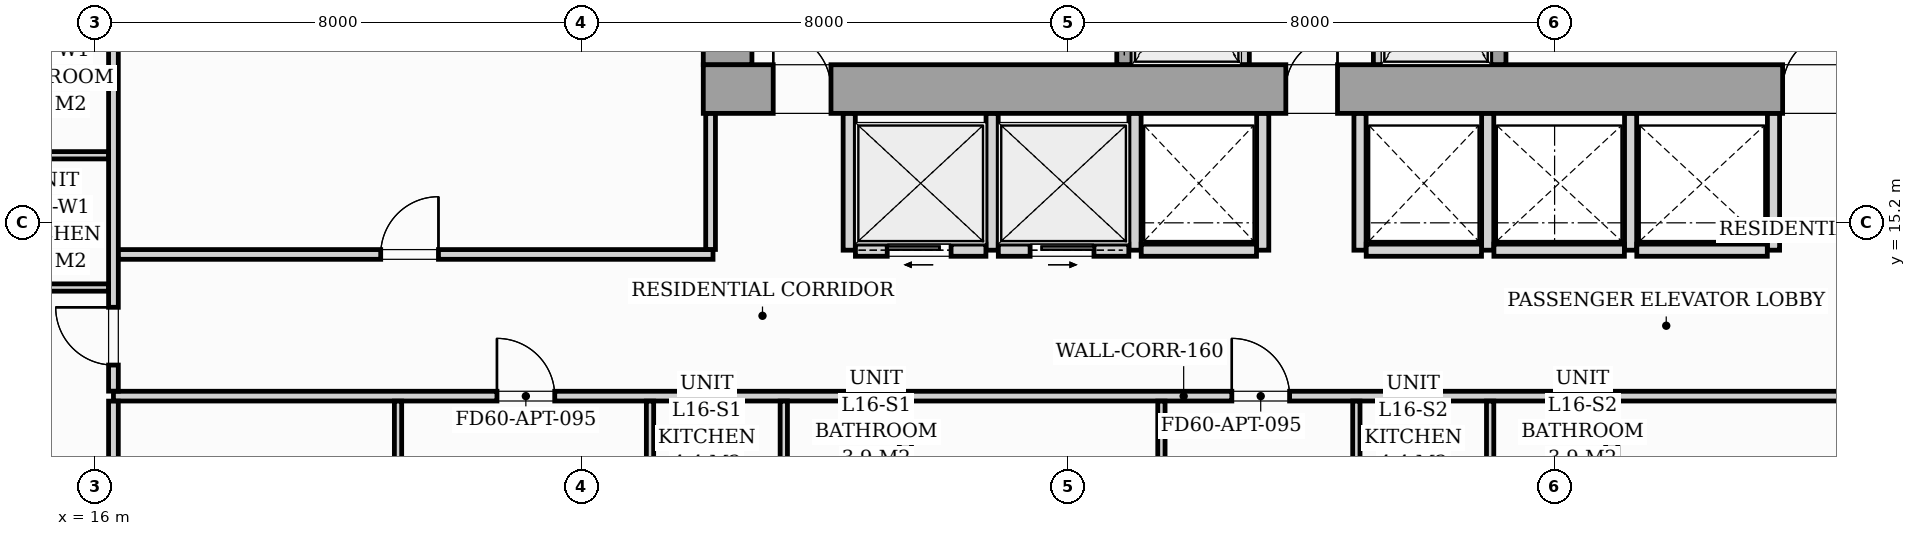
"""IFC4 building model, lengths in metres.
Left out: names, types, materials, properties, quantities, classifications, styles, units other than length and angle.
Written with IfcOpenShell. Run it as: python <this file> out.ifc"""

import sys

from ifc_helpers import new_model, si_unit, direction, frame, frame_2d, origin, origin_2d, place, context, subcontext, project, spatial, rectangle, i_section, extrude, source, transform, mapped, element, fill, save


model = new_model("IFC4")
c1 = context("Model", 3, precision=1e-05, world=origin(), true_north=direction((0.0, 1.0)))
c2 = subcontext(c1, "Body", "Model", "MODEL_VIEW")
j1 = project(units=[si_unit("LENGTHUNIT", "METRE"), si_unit("PLANEANGLEUNIT", "RADIAN")], contexts=[c1])
p1 = place(None, origin())
s1 = spatial("IfcSite", under=j1, at=p1, CompositionType="ELEMENT")
p2 = place(p1, origin())
s2 = spatial("IfcBuilding", under=s1, at=p2, CompositionType="ELEMENT")
p3 = place(p2, frame((0.0, 0.0, 58.2)))
s3 = spatial("IfcBuildingStorey", under=s2, at=p3, CompositionType="ELEMENT", Elevation=58.2)
m1 = source(origin(), c2, "Body", "SweptSolid", [
    extrude(i_section(OverallWidth=0.437, OverallDepth=0.514, WebThickness=0.061, FlangeThickness=0.097, FilletRadius=0.018, at=origin_2d()), origin(), (0.0, 0.0, 1.0), 3.196),
])
for number, where, z_axis, x_axis in (
    (1, (26.4, 17.4, 0.002), (0.0, 0.0, 1.0), (1.0, 0.0, 0.0)),
    (2, (33.12, 17.4, 0.002), (0.0, 0.0, 1.0), (1.0, 0.0, 0.0)),
    (3, (38.88, 17.4, 0.002), (0.0, 0.0, 1.0), (1.0, 0.0, 0.0)),
):
    element("IfcColumn", number, at=place(p3, frame(where, z_axis=z_axis, x_axis=x_axis)), inside=s3, PredefinedType="PILASTER", context=c2, shape_type="MappedRepresentation", body=[
        mapped(m1, transform((0.0, 0.0, 0.0), scale=1.0)),
    ])
p4 = place(p3, frame((26.0, 17.4, 0.0), z_axis=(0.0, 0.0, 1.0), x_axis=(1.0, 0.0, 0.0)))
e4 = element("IfcWall", 4, at=p4, inside=s3, PredefinedType="SHEAR", context=c2, shape_type="SweptSolid", body=[
    extrude(rectangle(XDim=20.0, YDim=0.8, at=frame_2d((10.0, 0.0))), origin(), (0.0, 0.0, 1.0), 3.2),
])
p5 = place(p4, frame((1.15, 0.0, 0.0)))
e5 = element("IfcOpeningElement", 5, at=p5, cuts=e4, PredefinedType="OPENING", context=c2, shape_type="SweptSolid", body=[
    extrude(rectangle(XDim=0.95, YDim=2.06, at=frame_2d((0.475, 1.03))), frame((0.0, 0.41, 0.0), z_axis=(0.0, -1.0, 0.0), x_axis=(1.0, 0.0, 0.0)), (0.0, 0.0, 1.0), 0.82),
])
p6 = place(p4, frame((9.58, 0.0, 0.0)))
e6 = element("IfcOpeningElement", 6, at=p6, cuts=e4, PredefinedType="OPENING", context=c2, shape_type="SweptSolid", body=[
    extrude(rectangle(XDim=0.85, YDim=2.0, at=frame_2d((0.425, 1.0))), frame((0.0, 0.41, 0.0), z_axis=(0.0, -1.0, 0.0), x_axis=(1.0, 0.0, 0.0)), (0.0, 0.0, 1.0), 0.82),
])
p7 = place(p4, frame((17.75, 0.0, 0.0)))
e7 = element("IfcOpeningElement", 7, at=p7, cuts=e4, PredefinedType="OPENING", context=c2, shape_type="SweptSolid", body=[
    extrude(rectangle(XDim=0.95, YDim=2.06, at=frame_2d((0.475, 1.03))), frame((0.0, 0.41, 0.0), z_axis=(0.0, -1.0, 0.0), x_axis=(1.0, 0.0, 0.0)), (0.0, 0.0, 1.0), 0.82),
])
p8 = place(p3, frame((26.4, 17.802, 0.0), z_axis=(0.0, 0.0, 1.0), x_axis=(0.0, 1.0, 0.0)))
e8 = element("IfcWall", 8, at=p8, inside=s3, PredefinedType="SHEAR", context=c2, shape_type="SweptSolid", body=[
    extrude(rectangle(XDim=5.796, YDim=0.8, at=frame_2d((2.898, 0.0))), origin(), (0.0, 0.0, 1.0), 3.2),
])
p9 = place(p3, frame((32.925, 17.802, 0.0), z_axis=(0.0, 0.0, 1.0), x_axis=(0.0, 1.0, 0.0)))
e9 = element("IfcWall", 9, at=p9, inside=s3, PredefinedType="SOLIDWALL", context=c2, shape_type="SweptSolid", body=[
    extrude(rectangle(XDim=2.646, YDim=0.25, at=frame_2d((1.323, 0.0))), origin(), (0.0, 0.0, 1.0), 3.2),
])
p10 = place(p9, frame((0.648, 0.0, 0.0)))
e10 = element("IfcOpeningElement", 10, at=p10, cuts=e9, PredefinedType="OPENING", context=c2, shape_type="SweptSolid", body=[
    extrude(rectangle(XDim=1.1, YDim=2.08, at=frame_2d((0.55, 1.04))), frame((0.0, 0.135, 0.0), z_axis=(0.0, -1.0, 0.0), x_axis=(1.0, 0.0, 0.0)), (0.0, 0.0, 1.0), 0.27),
])
for number, where, z_axis, x_axis in (
    (11, (34.9, 17.802, 0.0), (0.0, 0.0, 1.0), (0.0, 1.0, 0.0)),
    (12, (37.1, 17.802, 0.0), (0.0, 0.0, 1.0), (0.0, 1.0, 0.0)),
):
    element("IfcWall", number, at=place(p3, frame(where, z_axis=z_axis, x_axis=x_axis)), inside=s3, PredefinedType="PARTITIONING", context=c2, shape_type="SweptSolid", body=[
        extrude(rectangle(XDim=2.646, YDim=0.16, at=frame_2d((1.323, 0.0))), origin(), (0.0, 0.0, 1.0), 2.94),
    ])
p11 = place(p3, frame((39.075, 17.802, 0.0), z_axis=(0.0, 0.0, 1.0), x_axis=(0.0, 1.0, 0.0)))
e13 = element("IfcWall", 13, at=p11, inside=s3, PredefinedType="SOLIDWALL", context=c2, shape_type="SweptSolid", body=[
    extrude(rectangle(XDim=2.646, YDim=0.25, at=frame_2d((1.323, 0.0))), origin(), (0.0, 0.0, 1.0), 3.2),
])
p12 = place(p11, frame((0.648, 0.0, 0.0)))
e14 = element("IfcOpeningElement", 14, at=p12, cuts=e13, PredefinedType="OPENING", context=c2, shape_type="SweptSolid", body=[
    extrude(rectangle(XDim=1.1, YDim=2.08, at=frame_2d((0.55, 1.04))), frame((0.0, 0.135, 0.0), z_axis=(0.0, -1.0, 0.0), x_axis=(1.0, 0.0, 0.0)), (0.0, 0.0, 1.0), 0.27),
])
for number, where, z_axis, x_axis in (
    (15, (28.4, 14.75, 0.0), (0.0, 0.0, 1.0), (0.0, 1.0, 0.0)),
    (16, (30.75, 14.75, 0.0), (0.0, 0.0, 1.0), (0.0, 1.0, 0.0)),
    (17, (33.1, 14.75, 0.0), (0.0, 0.0, 1.0), (0.0, 1.0, 0.0)),
):
    element("IfcWall", number, at=place(p3, frame(where, z_axis=z_axis, x_axis=x_axis)), inside=s3, PredefinedType="PARTITIONING", context=c2, shape_type="SweptSolid", body=[
        extrude(rectangle(XDim=2.248, YDim=0.2, at=frame_2d((1.124, 0.0))), origin(), (0.0, 0.0, 1.0), 2.94),
    ])
p13 = place(p3, frame((28.502, 14.75, 0.0), z_axis=(0.0, 0.0, 1.0), x_axis=(1.0, 0.0, 0.0)))
e18 = element("IfcWall", 18, at=p13, inside=s3, PredefinedType="PARTITIONING", context=c2, shape_type="SweptSolid", body=[
    extrude(rectangle(XDim=2.146, YDim=0.2, at=frame_2d((1.073, 0.0))), origin(), (0.0, 0.0, 1.0), 2.94),
])
p14 = place(p13, frame((0.523, 0.0, 0.0)))
e19 = element("IfcOpeningElement", 19, at=p14, cuts=e18, PredefinedType="OPENING", context=c2, shape_type="SweptSolid", body=[
    extrude(rectangle(XDim=1.05, YDim=2.08, at=frame_2d((0.525, 1.04))), frame((0.0, 0.11, 0.0), z_axis=(0.0, -1.0, 0.0), x_axis=(1.0, 0.0, 0.0)), (0.0, 0.0, 1.0), 0.22),
])
p15 = place(p3, frame((30.852, 14.75, 0.0), z_axis=(0.0, 0.0, 1.0), x_axis=(1.0, 0.0, 0.0)))
e20 = element("IfcWall", 20, at=p15, inside=s3, PredefinedType="PARTITIONING", context=c2, shape_type="SweptSolid", body=[
    extrude(rectangle(XDim=2.146, YDim=0.2, at=frame_2d((1.073, 0.0))), origin(), (0.0, 0.0, 1.0), 2.94),
])
p16 = place(p15, frame((0.523, 0.0, 0.0)))
e21 = element("IfcOpeningElement", 21, at=p16, cuts=e20, PredefinedType="OPENING", context=c2, shape_type="SweptSolid", body=[
    extrude(rectangle(XDim=1.05, YDim=2.08, at=frame_2d((0.525, 1.04))), frame((0.0, 0.11, 0.0), z_axis=(0.0, -1.0, 0.0), x_axis=(1.0, 0.0, 0.0)), (0.0, 0.0, 1.0), 0.22),
])
p17 = place(p3, frame((35.2, 14.75, 0.0), z_axis=(0.0, 0.0, 1.0), x_axis=(0.0, 1.0, 0.0)))
e22 = element("IfcWall", 22, at=p17, inside=s3, PredefinedType="PARTITIONING", context=c2, shape_type="SweptSolid", body=[
    extrude(rectangle(XDim=2.248, YDim=0.2, at=frame_2d((1.124, 0.0))), origin(), (0.0, 0.0, 1.0), 2.94),
])
p18 = place(p3, frame((33.202, 14.75, 0.0), z_axis=(0.0, 0.0, 1.0), x_axis=(1.0, 0.0, 0.0)))
e23 = element("IfcWall", 23, at=p18, inside=s3, PredefinedType="PARTITIONING", context=c2, shape_type="SweptSolid", body=[
    extrude(rectangle(XDim=1.896, YDim=0.2, at=frame_2d((0.948, 0.0))), origin(), (0.0, 0.0, 1.0), 2.94),
])
for number, where, z_axis, x_axis in (
    (24, (36.8, 14.75, 0.0), (0.0, 0.0, 1.0), (0.0, 1.0, 0.0)),
    (25, (38.9, 14.75, 0.0), (0.0, 0.0, 1.0), (0.0, 1.0, 0.0)),
):
    element("IfcWall", number, at=place(p3, frame(where, z_axis=z_axis, x_axis=x_axis)), inside=s3, PredefinedType="PARTITIONING", context=c2, shape_type="SweptSolid", body=[
        extrude(rectangle(XDim=2.248, YDim=0.2, at=frame_2d((1.124, 0.0))), origin(), (0.0, 0.0, 1.0), 2.94),
    ])
p19 = place(p3, frame((36.902, 14.75, 0.0), z_axis=(0.0, 0.0, 1.0), x_axis=(1.0, 0.0, 0.0)))
e26 = element("IfcWall", 26, at=p19, inside=s3, PredefinedType="PARTITIONING", context=c2, shape_type="SweptSolid", body=[
    extrude(rectangle(XDim=1.896, YDim=0.2, at=frame_2d((0.948, 0.0))), origin(), (0.0, 0.0, 1.0), 2.94),
])
for number, where, z_axis, x_axis in (
    (27, (41.25, 14.75, 0.0), (0.0, 0.0, 1.0), (0.0, 1.0, 0.0)),
    (28, (43.6, 14.75, 0.0), (0.0, 0.0, 1.0), (0.0, 1.0, 0.0)),
):
    element("IfcWall", number, at=place(p3, frame(where, z_axis=z_axis, x_axis=x_axis)), inside=s3, PredefinedType="PARTITIONING", context=c2, shape_type="SweptSolid", body=[
        extrude(rectangle(XDim=2.248, YDim=0.2, at=frame_2d((1.124, 0.0))), origin(), (0.0, 0.0, 1.0), 2.94),
    ])
for number, where, z_axis, x_axis in (
    (29, (39.002, 14.75, 0.0), (0.0, 0.0, 1.0), (1.0, 0.0, 0.0)),
    (30, (41.352, 14.75, 0.0), (0.0, 0.0, 1.0), (1.0, 0.0, 0.0)),
):
    element("IfcWall", number, at=place(p3, frame(where, z_axis=z_axis, x_axis=x_axis)), inside=s3, PredefinedType="PARTITIONING", context=c2, shape_type="SweptSolid", body=[
        extrude(rectangle(XDim=2.146, YDim=0.2, at=frame_2d((1.073, 0.0))), origin(), (0.0, 0.0, 1.0), 2.94),
    ])
p20 = place(p3, frame((16.3, 12.35, 0.0), z_axis=(0.0, 0.0, 1.0), x_axis=(1.0, 0.0, 0.0)))
e31 = element("IfcWall", 31, at=p20, inside=s3, PredefinedType="PARTITIONING", context=c2, shape_type="SweptSolid", body=[
    extrude(rectangle(XDim=35.2, YDim=0.16, at=frame_2d((17.6, 0.0))), origin(), (0.0, 0.0, 1.0), 2.94),
])
p21 = place(p20, frame((6.307, 0.0, 0.0)))
e32 = element("IfcOpeningElement", 32, at=p21, cuts=e31, PredefinedType="OPENING", context=c2, shape_type="SweptSolid", body=[
    extrude(rectangle(XDim=0.95, YDim=2.06, at=frame_2d((0.475, 1.03))), frame((0.0, 0.09, 0.0), z_axis=(0.0, -1.0, 0.0), x_axis=(1.0, 0.0, 0.0)), (0.0, 0.0, 1.0), 0.18),
])
p22 = place(p20, frame((18.392, 0.0, 0.0)))
e33 = element("IfcOpeningElement", 33, at=p22, cuts=e31, PredefinedType="OPENING", context=c2, shape_type="SweptSolid", body=[
    extrude(rectangle(XDim=0.95, YDim=2.06, at=frame_2d((0.475, 1.03))), frame((0.0, 0.09, 0.0), z_axis=(0.0, -1.0, 0.0), x_axis=(1.0, 0.0, 0.0)), (0.0, 0.0, 1.0), 0.18),
])
p23 = place(p20, frame((29.304, 0.0, 0.0)))
e34 = element("IfcOpeningElement", 34, at=p23, cuts=e31, PredefinedType="OPENING", context=c2, shape_type="SweptSolid", body=[
    extrude(rectangle(XDim=0.95, YDim=2.06, at=frame_2d((0.475, 1.03))), frame((0.0, 0.09, 0.0), z_axis=(0.0, -1.0, 0.0), x_axis=(1.0, 0.0, 0.0)), (0.0, 0.0, 1.0), 0.18),
])
p24 = place(p3, frame((16.3, 2.962, 0.0), z_axis=(0.0, 0.0, 1.0), x_axis=(0.0, 1.0, 0.0)))
e35 = element("IfcWall", 35, at=p24, inside=s3, PredefinedType="PARTITIONING", context=c2, shape_type="SweptSolid", body=[
    extrude(rectangle(XDim=9.306, YDim=0.16, at=frame_2d((4.653, 0.0))), origin(), (0.0, 0.0, 1.0), 2.94),
])
p25 = place(p3, frame((16.3, 12.432, 0.0), z_axis=(0.0, 0.0, 1.0), x_axis=(0.0, 1.0, 0.0)))
e36 = element("IfcWall", 36, at=p25, inside=s3, PredefinedType="PARTITIONING", context=c2, shape_type="SweptSolid", body=[
    extrude(rectangle(XDim=15.006, YDim=0.16, at=frame_2d((7.503, 0.0))), origin(), (0.0, 0.0, 1.0), 2.94),
])
p26 = place(p25, frame((0.429, 0.0, 0.0)))
e37 = element("IfcOpeningElement", 37, at=p26, cuts=e36, PredefinedType="OPENING", context=c2, shape_type="SweptSolid", body=[
    extrude(rectangle(XDim=0.95, YDim=2.06, at=frame_2d((0.475, 1.03))), frame((0.0, 0.09, 0.0), z_axis=(0.0, -1.0, 0.0), x_axis=(1.0, 0.0, 0.0)), (0.0, 0.0, 1.0), 0.18),
])
for number, where, z_axis, x_axis in (
    (38, (25.124, 10.162, 0.0), (0.0, 0.0, 1.0), (0.0, 1.0, 0.0)),
    (39, (27.324, 10.162, 0.0), (0.0, 0.0, 1.0), (0.0, 1.0, 0.0)),
):
    element("IfcWall", number, at=place(p3, frame(where, z_axis=z_axis, x_axis=x_axis)), inside=s3, PredefinedType="PARTITIONING", context=c2, shape_type="SweptSolid", body=[
        extrude(rectangle(XDim=2.106, YDim=0.12, at=frame_2d((1.053, 0.0))), origin(), (0.0, 0.0, 1.0), 2.94),
    ])
p27 = place(p3, frame((20.98, 2.962, 0.0), z_axis=(0.0, 0.0, 1.0), x_axis=(0.0, 1.0, 0.0)))
e40 = element("IfcWall", 40, at=p27, inside=s3, PredefinedType="PARTITIONING", context=c2, shape_type="SweptSolid", body=[
    extrude(rectangle(XDim=9.306, YDim=0.12, at=frame_2d((4.653, 0.0))), origin(), (0.0, 0.0, 1.0), 2.94),
])
p28 = place(p27, frame((4.218, 0.0, 0.0)))
e41 = element("IfcOpeningElement", 41, at=p28, cuts=e40, PredefinedType="OPENING", context=c2, shape_type="SweptSolid", body=[
    extrude(rectangle(XDim=0.85, YDim=2.05, at=frame_2d((0.425, 1.025))), frame((0.0, 0.07, 0.0), z_axis=(0.0, -1.0, 0.0), x_axis=(1.0, 0.0, 0.0)), (0.0, 0.0, 1.0), 0.14),
])
p29 = place(p3, frame((29.324, 10.162, 0.0), z_axis=(0.0, 0.0, 1.0), x_axis=(0.0, 1.0, 0.0)))
e42 = element("IfcWall", 42, at=p29, inside=s3, PredefinedType="PARTITIONING", context=c2, shape_type="SweptSolid", body=[
    extrude(rectangle(XDim=2.106, YDim=0.2, at=frame_2d((1.053, 0.0))), origin(), (0.0, 0.0, 1.0), 2.94),
])
for number, where, z_axis, x_axis in (
    (43, (36.74, 10.162, 0.0), (0.0, 0.0, 1.0), (0.0, 1.0, 0.0)),
    (44, (38.94, 10.162, 0.0), (0.0, 0.0, 1.0), (0.0, 1.0, 0.0)),
):
    element("IfcWall", number, at=place(p3, frame(where, z_axis=z_axis, x_axis=x_axis)), inside=s3, PredefinedType="PARTITIONING", context=c2, shape_type="SweptSolid", body=[
        extrude(rectangle(XDim=2.106, YDim=0.12, at=frame_2d((1.053, 0.0))), origin(), (0.0, 0.0, 1.0), 2.94),
    ])
p30 = place(p3, frame((33.534, 2.78, 0.0), z_axis=(0.0, 0.0, 1.0), x_axis=(0.0, 1.0, 0.0)))
e45 = element("IfcWall", 45, at=p30, inside=s3, PredefinedType="PARTITIONING", context=c2, shape_type="SweptSolid", body=[
    extrude(rectangle(XDim=9.488, YDim=0.12, at=frame_2d((4.744, 0.0))), origin(), (0.0, 0.0, 1.0), 2.94),
])
p31 = place(p30, frame((4.4, 0.0, 0.0)))
e46 = element("IfcOpeningElement", 46, at=p31, cuts=e45, PredefinedType="OPENING", context=c2, shape_type="SweptSolid", body=[
    extrude(rectangle(XDim=0.85, YDim=2.05, at=frame_2d((0.425, 1.025))), frame((0.0, 0.07, 0.0), z_axis=(0.0, -1.0, 0.0), x_axis=(1.0, 0.0, 0.0)), (0.0, 0.0, 1.0), 0.14),
])
p32 = place(p3, frame((40.94, 10.162, 0.0), z_axis=(0.0, 0.0, 1.0), x_axis=(0.0, 1.0, 0.0)))
e47 = element("IfcWall", 47, at=p32, inside=s3, PredefinedType="PARTITIONING", context=c2, shape_type="SweptSolid", body=[
    extrude(rectangle(XDim=2.106, YDim=0.2, at=frame_2d((1.053, 0.0))), origin(), (0.0, 0.0, 1.0), 2.94),
])
p33 = place(p3, frame((13.962, 16.311, 0.0), z_axis=(0.0, 0.0, 1.0), x_axis=(1.0, 0.0, 0.0)))
e48 = element("IfcWall", 48, at=p33, inside=s3, PredefinedType="PARTITIONING", context=c2, shape_type="SweptSolid", body=[
    extrude(rectangle(XDim=2.256, YDim=0.12, at=frame_2d((1.128, 0.0))), origin(), (0.0, 0.0, 1.0), 2.045),
])
p34 = place(p3, frame((13.962, 14.136, 0.0), z_axis=(0.0, 0.0, 1.0), x_axis=(1.0, 0.0, 0.0)))
e49 = element("IfcWall", 49, at=p34, inside=s3, PredefinedType="PARTITIONING", context=c2, shape_type="SweptSolid", body=[
    extrude(rectangle(XDim=2.256, YDim=0.12, at=frame_2d((1.128, 0.0))), origin(), (0.0, 0.0, 1.0), 2.94),
])
p35 = place(p3, frame((16.382, 14.68, 0.0), z_axis=(0.0, 0.0, 1.0), x_axis=(1.0, 0.0, 0.0)))
e50 = element("IfcWall", 50, at=p35, inside=s3, PredefinedType="PARTITIONING", context=c2, shape_type="SweptSolid", body=[
    extrude(rectangle(XDim=9.778, YDim=0.16, at=frame_2d((4.889, 0.0))), origin(), (0.0, 0.0, 1.0), 2.94),
])
p36 = place(p35, frame((4.313, 0.0, 0.0)))
e51 = element("IfcOpeningElement", 51, at=p36, cuts=e50, PredefinedType="OPENING", context=c2, shape_type="SweptSolid", body=[
    extrude(rectangle(XDim=0.95, YDim=2.06, at=frame_2d((0.475, 1.03))), frame((0.0, 0.09, 0.0), z_axis=(0.0, -1.0, 0.0), x_axis=(1.0, 0.0, 0.0)), (0.0, 0.0, 1.0), 0.18),
])
p37 = place(p3, frame((26.12, 14.762, 0.0), z_axis=(0.0, 0.0, 1.0), x_axis=(0.0, 1.0, 0.0)))
e52 = element("IfcWall", 52, at=p37, inside=s3, PredefinedType="PARTITIONING", context=c2, shape_type="SweptSolid", body=[
    extrude(rectangle(XDim=2.236, YDim=0.16, at=frame_2d((1.118, 0.0))), origin(), (0.0, 0.0, 1.0), 2.94),
])
m2 = source(origin(), c2, "Body", "SweptSolid", [
    extrude(rectangle(XDim=0.95, YDim=2.06, at=frame_2d((0.475, 1.03))), frame((0.0, 0.025, 0.0), z_axis=(0.0, -1.0, 0.0), x_axis=(1.0, 0.0, 0.0)), (0.0, 0.0, 1.0), 0.05),
])
p38 = place(p5, origin())
e53 = element("IfcDoor", 53, at=p38, inside=s3, OperationType="SINGLE_SWING_LEFT", PredefinedType="DOOR", context=c2, shape_type="MappedRepresentation", body=[
    mapped(m2, transform((0.0, 0.0, 0.0), scale=1.0)),
])
fill(e5, e53)
m3 = source(origin(), c2, "Body", "SweptSolid", [
    extrude(rectangle(XDim=0.85, YDim=2.0, at=frame_2d((0.425, 1.0))), frame((0.0, 0.025, 0.0), z_axis=(0.0, -1.0, 0.0), x_axis=(1.0, 0.0, 0.0)), (0.0, 0.0, 1.0), 0.05),
])
p39 = place(p6, origin())
e54 = element("IfcDoor", 54, at=p39, inside=s3, OperationType="SINGLE_SWING_RIGHT", PredefinedType="DOOR", context=c2, shape_type="MappedRepresentation", body=[
    mapped(m3, transform((0.0, 0.0, 0.0), scale=1.0)),
])
fill(e6, e54)
p40 = place(p7, origin())
e55 = element("IfcDoor", 55, at=p40, inside=s3, OperationType="SINGLE_SWING_RIGHT", PredefinedType="DOOR", context=c2, shape_type="MappedRepresentation", body=[
    mapped(m2, transform((0.0, 0.0, 0.0), scale=1.0)),
])
fill(e7, e55)
m4 = source(origin(), c2, "Body", "SweptSolid", [
    extrude(rectangle(XDim=1.05, YDim=2.08, at=frame_2d((0.525, 1.04))), frame((0.0, 0.025, 0.0), z_axis=(0.0, -1.0, 0.0), x_axis=(1.0, 0.0, 0.0)), (0.0, 0.0, 1.0), 0.05),
])
p41 = place(p14, origin())
e56 = element("IfcDoor", 56, at=p41, inside=s3, OperationType="SLIDING_TO_LEFT", PredefinedType="DOOR", context=c2, shape_type="MappedRepresentation", body=[
    mapped(m4, transform((0.0, 0.0, 0.0), scale=1.0)),
])
fill(e19, e56)
p42 = place(p16, origin())
e57 = element("IfcDoor", 57, at=p42, inside=s3, OperationType="SLIDING_TO_RIGHT", PredefinedType="DOOR", context=c2, shape_type="MappedRepresentation", body=[
    mapped(m4, transform((0.0, 0.0, 0.0), scale=1.0)),
])
fill(e21, e57)
m5 = source(origin(), c2, "Body", "SweptSolid", [
    extrude(rectangle(XDim=0.95, YDim=2.06, at=frame_2d((0.475, 1.03))), frame((0.0, 0.025, 0.0), z_axis=(0.0, -1.0, 0.0), x_axis=(1.0, 0.0, 0.0)), (0.0, 0.0, 1.0), 0.05),
])
p43 = place(p21, origin())
e58 = element("IfcDoor", 58, at=p43, inside=s3, OperationType="SINGLE_SWING_LEFT", PredefinedType="DOOR", context=c2, shape_type="MappedRepresentation", body=[
    mapped(m5, transform((0.0, 0.0, 0.0), scale=1.0)),
])
fill(e32, e58)
p44 = place(p22, origin())
e59 = element("IfcDoor", 59, at=p44, inside=s3, OperationType="SINGLE_SWING_LEFT", PredefinedType="DOOR", context=c2, shape_type="MappedRepresentation", body=[
    mapped(m5, transform((0.0, 0.0, 0.0), scale=1.0)),
])
fill(e33, e59)
p45 = place(p26, origin())
e60 = element("IfcDoor", 60, at=p45, inside=s3, OperationType="SINGLE_SWING_RIGHT", PredefinedType="DOOR", context=c2, shape_type="MappedRepresentation", body=[
    mapped(m5, transform((0.0, 0.0, 0.0), scale=1.0)),
])
fill(e37, e60)
p46 = place(p36, origin())
e61 = element("IfcDoor", 61, at=p46, inside=s3, OperationType="SINGLE_SWING_RIGHT", PredefinedType="DOOR", context=c2, shape_type="MappedRepresentation", body=[
    mapped(m5, transform((0.0, 0.0, 0.0), scale=1.0)),
])
fill(e51, e61)
save(model, sys.argv[1])
